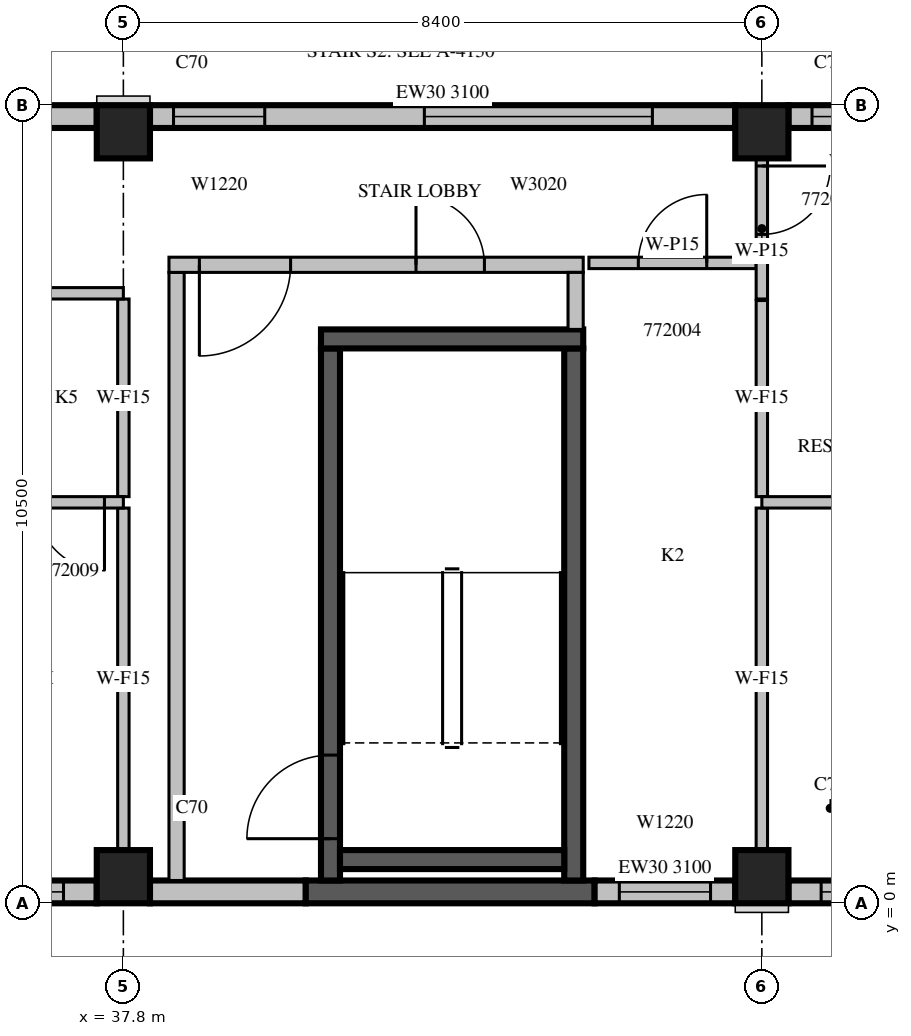
"""IFC4 building model, lengths in metres.
Left out: names, types, materials, properties, quantities, classifications, styles, units other than length and angle.
Written with IfcOpenShell. Run it as: python <this file> out.ifc"""

import sys

from ifc_helpers import new_model, si_unit, direction, frame, frame_2d, origin, origin_2d, place, context, subcontext, project, spatial, rectangle, extrude, source, transform, mapped, element, fill, save


model = new_model("IFC4")
c1 = context("Model", 3, precision=1e-05, world=origin(), true_north=direction((0.0, 1.0)))
c2 = subcontext(c1, "Body", "Model", "MODEL_VIEW")
j1 = project(units=[si_unit("LENGTHUNIT", "METRE"), si_unit("PLANEANGLEUNIT", "RADIAN")], contexts=[c1])
p1 = place(None, origin())
s1 = spatial("IfcSite", under=j1, at=p1, CompositionType="ELEMENT")
p2 = place(p1, origin())
s2 = spatial("IfcBuilding", under=s1, at=p2, CompositionType="ELEMENT")
p3 = place(p2, frame((0.0, 0.0, 312.5)))
s3 = spatial("IfcBuildingStorey", under=s2, at=p3, CompositionType="ELEMENT", Elevation=312.5)
m1 = source(origin(), c2, "Body", "SweptSolid", [
    extrude(rectangle(XDim=0.7, YDim=0.7, at=origin_2d()), origin(), (0.0, 0.0, 1.0), 3.5),
])
for number, where, z_axis, x_axis in (
    (1, (37.8, 0.35, 0.0), (0.0, 0.0, 1.0), (1.0, 0.0, 0.0)),
    (2, (46.2, 0.35, 0.0), (0.0, 0.0, 1.0), (1.0, 0.0, 0.0)),
    (3, (37.8, 10.15, 0.0), (0.0, 0.0, 1.0), (1.0, 0.0, 0.0)),
    (4, (46.2, 10.15, 0.0), (0.0, 0.0, 1.0), (1.0, 0.0, 0.0)),
):
    element("IfcColumn", number, at=place(p3, frame(where, z_axis=z_axis, x_axis=x_axis)), inside=s3, PredefinedType="COLUMN", context=c2, shape_type="MappedRepresentation", body=[
        mapped(m1, transform((0.0, 0.0, 0.0), scale=1.0)),
    ])
m2 = source(origin(), c2, "Body", "SweptSolid", [
    extrude(rectangle(XDim=7.7, YDim=0.3, at=frame_2d((3.85, 0.0))), origin(), (0.0, 0.0, 1.0), 3.1),
])
p4 = place(p3, frame((29.75, 0.15, 0.0), z_axis=(0.0, 0.0, 1.0), x_axis=(1.0, 0.0, 0.0)))
e5 = element("IfcWall", 5, at=p4, inside=s3, PredefinedType="STANDARD", context=c2, shape_type="MappedRepresentation", body=[
    mapped(m2, transform((0.0, 0.0, 0.0), scale=1.0)),
])
m3 = source(origin(), c2, "Body", "SweptSolid", [
    extrude(rectangle(XDim=1.2, YDim=2.0, at=frame_2d((0.6, 1.0))), frame((0.0, 0.16, 0.0), z_axis=(0.0, -1.0, 0.0), x_axis=(1.0, 0.0, 0.0)), (0.0, 0.0, 1.0), 0.32),
])
p5 = place(p4, frame((0.537, 0.0, 0.6)))
e6 = element("IfcOpeningElement", 6, at=p5, cuts=e5, PredefinedType="OPENING", context=c2, shape_type="MappedRepresentation", body=[
    mapped(m3, transform((0.0, 0.0, 0.0), scale=1.0)),
])
p6 = place(p4, frame((6.062, 0.0, 0.6)))
e7 = element("IfcOpeningElement", 7, at=p6, cuts=e5, PredefinedType="OPENING", context=c2, shape_type="MappedRepresentation", body=[
    mapped(m3, transform((0.0, 0.0, 0.0), scale=1.0)),
])
m4 = source(origin(), c2, "Body", "SweptSolid", [
    extrude(rectangle(XDim=2.05, YDim=0.3, at=frame_2d((1.025, 0.0))), origin(), (0.0, 0.0, 1.0), 3.1),
])
p7 = place(p3, frame((38.15, 0.15, 0.0), z_axis=(0.0, 0.0, 1.0), x_axis=(1.0, 0.0, 0.0)))
e8 = element("IfcWall", 8, at=p7, inside=s3, PredefinedType="STANDARD", context=c2, shape_type="MappedRepresentation", body=[
    mapped(m4, transform((0.0, 0.0, 0.0), scale=1.0)),
])
m5 = source(origin(), c2, "Body", "SweptSolid", [
    extrude(rectangle(XDim=3.8, YDim=0.3, at=frame_2d((1.9, 0.0))), origin(), (0.0, 0.0, 1.0), 3.1),
])
p8 = place(p3, frame((40.2, 0.15, 0.0), z_axis=(0.0, 0.0, 1.0), x_axis=(1.0, 0.0, 0.0)))
e9 = element("IfcWall", 9, at=p8, inside=s3, PredefinedType="SOLIDWALL", context=c2, shape_type="MappedRepresentation", body=[
    mapped(m5, transform((0.0, 0.0, 0.0), scale=1.0)),
])
m6 = source(origin(), c2, "Body", "SweptSolid", [
    extrude(rectangle(XDim=1.85, YDim=0.3, at=frame_2d((0.925, 0.0))), origin(), (0.0, 0.0, 1.0), 3.1),
])
p9 = place(p3, frame((44.0, 0.15, 0.0), z_axis=(0.0, 0.0, 1.0), x_axis=(1.0, 0.0, 0.0)))
e10 = element("IfcWall", 10, at=p9, inside=s3, PredefinedType="STANDARD", context=c2, shape_type="MappedRepresentation", body=[
    mapped(m6, transform((0.0, 0.0, 0.0), scale=1.0)),
])
p10 = place(p9, frame((0.325, 0.0, 0.6)))
e11 = element("IfcOpeningElement", 11, at=p10, cuts=e10, PredefinedType="OPENING", context=c2, shape_type="MappedRepresentation", body=[
    mapped(m3, transform((0.0, 0.0, 0.0), scale=1.0)),
])
m7 = source(origin(), c2, "Body", "SweptSolid", [
    extrude(rectangle(XDim=3.01, YDim=0.3, at=frame_2d((1.505, 0.0))), origin(), (0.0, 0.0, 1.0), 3.1),
])
p11 = place(p3, frame((46.55, 0.15, 0.0), z_axis=(0.0, 0.0, 1.0), x_axis=(1.0, 0.0, 0.0)))
e12 = element("IfcWall", 12, at=p11, inside=s3, PredefinedType="STANDARD", context=c2, shape_type="MappedRepresentation", body=[
    mapped(m7, transform((0.0, 0.0, 0.0), scale=1.0)),
])
m8 = source(origin(), c2, "Body", "SweptSolid", [
    extrude(rectangle(XDim=1.8, YDim=2.0, at=frame_2d((0.9, 1.0))), frame((0.0, 0.16, 0.0), z_axis=(0.0, -1.0, 0.0), x_axis=(1.0, 0.0, 0.0)), (0.0, 0.0, 1.0), 0.32),
])
p12 = place(p11, frame((0.43, 0.0, 0.6)))
e13 = element("IfcOpeningElement", 13, at=p12, cuts=e12, PredefinedType="OPENING", context=c2, shape_type="MappedRepresentation", body=[
    mapped(m8, transform((0.0, 0.0, 0.0), scale=1.0)),
])
p13 = place(p3, frame((49.56, 10.35, 0.0), z_axis=(0.0, 0.0, 1.0), x_axis=(-1.0, 0.0, 0.0)))
e14 = element("IfcWall", 14, at=p13, inside=s3, PredefinedType="STANDARD", context=c2, shape_type="MappedRepresentation", body=[
    mapped(m7, transform((0.0, 0.0, 0.0), scale=1.0)),
])
p14 = place(p13, frame((1.5, 0.0, 0.6)))
e15 = element("IfcOpeningElement", 15, at=p14, cuts=e14, PredefinedType="OPENING", context=c2, shape_type="MappedRepresentation", body=[
    mapped(m3, transform((0.0, 0.0, 0.0), scale=1.0)),
])
p15 = place(p3, frame((45.85, 10.35, 0.0), z_axis=(0.0, 0.0, 1.0), x_axis=(-1.0, 0.0, 0.0)))
e16 = element("IfcWall", 16, at=p15, inside=s3, PredefinedType="STANDARD", context=c2, shape_type="MappedRepresentation", body=[
    mapped(m2, transform((0.0, 0.0, 0.0), scale=1.0)),
])
m9 = source(origin(), c2, "Body", "SweptSolid", [
    extrude(rectangle(XDim=3.0, YDim=2.0, at=frame_2d((1.5, 1.0))), frame((0.0, 0.16, 0.0), z_axis=(0.0, -1.0, 0.0), x_axis=(1.0, 0.0, 0.0)), (0.0, 0.0, 1.0), 0.32),
])
p16 = place(p15, frame((1.09, 0.0, 0.6)))
e17 = element("IfcOpeningElement", 17, at=p16, cuts=e16, PredefinedType="OPENING", context=c2, shape_type="MappedRepresentation", body=[
    mapped(m9, transform((0.0, 0.0, 0.0), scale=1.0)),
])
p17 = place(p15, frame((6.19, 0.0, 0.6)))
e18 = element("IfcOpeningElement", 18, at=p17, cuts=e16, PredefinedType="OPENING", context=c2, shape_type="MappedRepresentation", body=[
    mapped(m3, transform((0.0, 0.0, 0.0), scale=1.0)),
])
p18 = place(p3, frame((37.45, 10.35, 0.0), z_axis=(0.0, 0.0, 1.0), x_axis=(-1.0, 0.0, 0.0)))
e19 = element("IfcWall", 19, at=p18, inside=s3, PredefinedType="STANDARD", context=c2, shape_type="MappedRepresentation", body=[
    mapped(m2, transform((0.0, 0.0, 0.0), scale=1.0)),
])
p19 = place(p18, frame((1.09, 0.0, 0.6)))
e20 = element("IfcOpeningElement", 20, at=p19, cuts=e19, PredefinedType="OPENING", context=c2, shape_type="MappedRepresentation", body=[
    mapped(m9, transform((0.0, 0.0, 0.0), scale=1.0)),
])
p20 = place(p18, frame((6.19, 0.0, 0.6)))
e21 = element("IfcOpeningElement", 21, at=p20, cuts=e19, PredefinedType="OPENING", context=c2, shape_type="MappedRepresentation", body=[
    mapped(m3, transform((0.0, 0.0, 0.0), scale=1.0)),
])
m10 = source(origin(), c2, "Body", "SweptSolid", [
    extrude(rectangle(XDim=7.0, YDim=0.25, at=frame_2d((3.5, 0.0))), origin(), (0.0, 0.0, 1.0), 3.1),
])
p21 = place(p3, frame((40.525, 0.3, 0.0), z_axis=(0.0, 0.0, 1.0), x_axis=(0.0, 1.0, 0.0)))
e22 = element("IfcWall", 22, at=p21, inside=s3, PredefinedType="SOLIDWALL", context=c2, shape_type="MappedRepresentation", body=[
    mapped(m10, transform((0.0, 0.0, 0.0), scale=1.0)),
])
m11 = source(origin(), c2, "Body", "SweptSolid", [
    extrude(rectangle(XDim=1.1, YDim=2.1, at=frame_2d((0.55, 1.05))), frame((0.0, 0.135, 0.0), z_axis=(0.0, -1.0, 0.0), x_axis=(1.0, 0.0, 0.0)), (0.0, 0.0, 1.0), 0.27),
])
p22 = place(p21, frame((0.55, 0.0, 0.0)))
e23 = element("IfcOpeningElement", 23, at=p22, cuts=e22, PredefinedType="OPENING", context=c2, shape_type="MappedRepresentation", body=[
    mapped(m11, transform((0.0, 0.0, 0.0), scale=1.0)),
])
p23 = place(p3, frame((43.725, 0.3, 0.0), z_axis=(0.0, 0.0, 1.0), x_axis=(0.0, 1.0, 0.0)))
e24 = element("IfcWall", 24, at=p23, inside=s3, PredefinedType="SOLIDWALL", context=c2, shape_type="MappedRepresentation", body=[
    mapped(m10, transform((0.0, 0.0, 0.0), scale=1.0)),
])
m12 = source(origin(), c2, "Body", "SweptSolid", [
    extrude(rectangle(XDim=3.45, YDim=0.25, at=frame_2d((1.725, 0.0))), origin(), (0.0, 0.0, 1.0), 3.1),
])
p24 = place(p3, frame((40.4, 7.425, 0.0), z_axis=(0.0, 0.0, 1.0), x_axis=(1.0, 0.0, 0.0)))
e25 = element("IfcWall", 25, at=p24, inside=s3, PredefinedType="SOLIDWALL", context=c2, shape_type="MappedRepresentation", body=[
    mapped(m12, transform((0.0, 0.0, 0.0), scale=1.0)),
])
m13 = source(origin(), c2, "Body", "SweptSolid", [
    extrude(rectangle(XDim=2.95, YDim=0.25, at=frame_2d((1.475, 0.0))), origin(), (0.0, 0.0, 1.0), 3.1),
])
p25 = place(p3, frame((40.65, 0.575, 0.0), z_axis=(0.0, 0.0, 1.0), x_axis=(1.0, 0.0, 0.0)))
e26 = element("IfcWall", 26, at=p25, inside=s3, PredefinedType="SOLIDWALL", context=c2, shape_type="MappedRepresentation", body=[
    mapped(m13, transform((0.0, 0.0, 0.0), scale=1.0)),
])
m14 = source(origin(), c2, "Body", "SweptSolid", [
    extrude(rectangle(XDim=8.0, YDim=0.2, at=frame_2d((4.0, 0.0))), origin(), (0.0, 0.0, 1.0), 3.1),
])
p26 = place(p3, frame((38.5, 0.3, 0.0), z_axis=(0.0, 0.0, 1.0), x_axis=(0.0, 1.0, 0.0)))
e27 = element("IfcWall", 27, at=p26, inside=s3, PredefinedType="PARTITIONING", context=c2, shape_type="MappedRepresentation", body=[
    mapped(m14, transform((0.0, 0.0, 0.0), scale=1.0)),
])
m15 = source(origin(), c2, "Body", "SweptSolid", [
    extrude(rectangle(XDim=5.45, YDim=0.2, at=frame_2d((2.725, 0.0))), origin(), (0.0, 0.0, 1.0), 3.1),
])
p27 = place(p3, frame((38.4, 8.4, 0.0), z_axis=(0.0, 0.0, 1.0), x_axis=(1.0, 0.0, 0.0)))
e28 = element("IfcWall", 28, at=p27, inside=s3, PredefinedType="PARTITIONING", context=c2, shape_type="MappedRepresentation", body=[
    mapped(m15, transform((0.0, 0.0, 0.0), scale=1.0)),
])
m16 = source(origin(), c2, "Body", "SweptSolid", [
    extrude(rectangle(XDim=1.2, YDim=2.1, at=frame_2d((0.6, 1.05))), frame((0.0, 0.11, 0.0), z_axis=(0.0, -1.0, 0.0), x_axis=(1.0, 0.0, 0.0)), (0.0, 0.0, 1.0), 0.22),
])
p28 = place(p27, frame((0.4, 0.0, 0.0)))
e29 = element("IfcOpeningElement", 29, at=p28, cuts=e28, PredefinedType="OPENING", context=c2, shape_type="MappedRepresentation", body=[
    mapped(m16, transform((0.0, 0.0, 0.0), scale=1.0)),
])
m17 = source(origin(), c2, "Body", "SweptSolid", [
    extrude(rectangle(XDim=0.9, YDim=2.1, at=frame_2d((0.45, 1.05))), frame((0.0, 0.11, 0.0), z_axis=(0.0, -1.0, 0.0), x_axis=(1.0, 0.0, 0.0)), (0.0, 0.0, 1.0), 0.22),
])
p29 = place(p27, frame((3.25, 0.0, 0.0)))
e30 = element("IfcOpeningElement", 30, at=p29, cuts=e28, PredefinedType="OPENING", context=c2, shape_type="MappedRepresentation", body=[
    mapped(m17, transform((0.0, 0.0, 0.0), scale=1.0)),
])
m18 = source(origin(), c2, "Body", "SweptSolid", [
    extrude(rectangle(XDim=0.75, YDim=0.2, at=frame_2d((0.375, 0.0))), origin(), (0.0, 0.0, 1.0), 3.1),
])
p30 = place(p3, frame((43.75, 7.55, 0.0), z_axis=(0.0, 0.0, 1.0), x_axis=(0.0, 1.0, 0.0)))
e31 = element("IfcWall", 31, at=p30, inside=s3, PredefinedType="PARTITIONING", context=c2, shape_type="MappedRepresentation", body=[
    mapped(m18, transform((0.0, 0.0, 0.0), scale=1.0)),
])
m19 = source(origin(), c2, "Body", "SweptSolid", [
    extrude(rectangle(XDim=2.2, YDim=0.15, at=frame_2d((1.1, 0.0))), origin(), (0.0, 0.0, 1.0), 3.1),
])
p31 = place(p3, frame((46.125, 8.425, 0.0), z_axis=(0.0, 0.0, 1.0), x_axis=(-1.0, 0.0, 0.0)))
e32 = element("IfcWall", 32, at=p31, inside=s3, PredefinedType="PARTITIONING", context=c2, shape_type="MappedRepresentation", body=[
    mapped(m19, transform((0.0, 0.0, 0.0), scale=1.0)),
])
m20 = source(origin(), c2, "Body", "SweptSolid", [
    extrude(rectangle(XDim=0.9, YDim=2.1, at=frame_2d((0.45, 1.05))), frame((0.0, 0.085, 0.0), z_axis=(0.0, -1.0, 0.0), x_axis=(1.0, 0.0, 0.0)), (0.0, 0.0, 1.0), 0.17),
])
p32 = place(p31, frame((0.65, 0.0, 0.0)))
e33 = element("IfcOpeningElement", 33, at=p32, cuts=e32, PredefinedType="OPENING", context=c2, shape_type="MappedRepresentation", body=[
    mapped(m20, transform((0.0, 0.0, 0.0), scale=1.0)),
])
p33 = place(p3, frame((37.8, 0.699, 0.0), z_axis=(0.0, 0.0, 1.0), x_axis=(0.0, 1.0, 0.0)))
e34 = element("IfcWall", 34, at=p33, inside=s3, PredefinedType="PARTITIONING", context=c2, shape_type="SweptSolid", body=[
    extrude(rectangle(XDim=4.501, YDim=0.15, at=frame_2d((2.251, 0.0))), origin(), (0.0, 0.0, 1.0), 3.1),
])
m21 = source(origin(), c2, "Body", "SweptSolid", [
    extrude(rectangle(XDim=2.6, YDim=0.15, at=frame_2d((1.3, 0.0))), origin(), (0.0, 0.0, 1.0), 3.1),
])
p34 = place(p3, frame((37.8, 5.35, 0.0), z_axis=(0.0, 0.0, 1.0), x_axis=(0.0, 1.0, 0.0)))
e35 = element("IfcWall", 35, at=p34, inside=s3, PredefinedType="PARTITIONING", context=c2, shape_type="MappedRepresentation", body=[
    mapped(m21, transform((0.0, 0.0, 0.0), scale=1.0)),
])
m22 = source(origin(), c2, "Body", "SweptSolid", [
    extrude(rectangle(XDim=8.4, YDim=0.15, at=frame_2d((4.2, 0.0))), origin(), (0.0, 0.0, 1.0), 3.1),
])
p35 = place(p3, frame((37.8, 5.275, 0.0), z_axis=(0.0, 0.0, 1.0), x_axis=(-1.0, 0.0, 0.0)))
e36 = element("IfcWall", 36, at=p35, inside=s3, PredefinedType="PARTITIONING", context=c2, shape_type="MappedRepresentation", body=[
    mapped(m22, transform((0.0, 0.0, 0.0), scale=1.0)),
])
m23 = source(origin(), c2, "Body", "SweptSolid", [
    extrude(rectangle(XDim=1.0, YDim=2.1, at=frame_2d((0.5, 1.05))), frame((0.0, 0.085, 0.0), z_axis=(0.0, -1.0, 0.0), x_axis=(1.0, 0.0, 0.0)), (0.0, 0.0, 1.0), 0.17),
])
p36 = place(p35, frame((4.332, 0.0, 0.0)))
e37 = element("IfcOpeningElement", 37, at=p36, cuts=e36, PredefinedType="OPENING", context=c2, shape_type="MappedRepresentation", body=[
    mapped(m23, transform((0.0, 0.0, 0.0), scale=1.0)),
])
p37 = place(p35, frame((6.433, 0.0, 0.0)))
e38 = element("IfcOpeningElement", 38, at=p37, cuts=e36, PredefinedType="OPENING", context=c2, shape_type="MappedRepresentation", body=[
    mapped(m20, transform((0.0, 0.0, 0.0), scale=1.0)),
])
p38 = place(p35, frame((0.248, 0.0, 0.0)))
e39 = element("IfcOpeningElement", 39, at=p38, cuts=e36, PredefinedType="OPENING", context=c2, shape_type="MappedRepresentation", body=[
    mapped(m20, transform((0.0, 0.0, 0.0), scale=1.0)),
])
m24 = source(origin(), c2, "Body", "SweptSolid", [
    extrude(rectangle(XDim=1.851, YDim=0.15, at=frame_2d((0.925, 0.0))), origin(), (0.0, 0.0, 1.0), 3.1),
])
p39 = place(p3, frame((46.2, 9.801, 0.0), z_axis=(0.0, 0.0, 1.0), x_axis=(0.0, -1.0, 0.0)))
e40 = element("IfcWall", 40, at=p39, inside=s3, PredefinedType="PARTITIONING", context=c2, shape_type="MappedRepresentation", body=[
    mapped(m24, transform((0.0, 0.0, 0.0), scale=1.0)),
])
p40 = place(p39, frame((0.101, 0.0, 0.0)))
e41 = element("IfcOpeningElement", 41, at=p40, cuts=e40, PredefinedType="OPENING", context=c2, shape_type="MappedRepresentation", body=[
    mapped(m20, transform((0.0, 0.0, 0.0), scale=1.0)),
])
m25 = source(origin(), c2, "Body", "SweptSolid", [
    extrude(rectangle(XDim=4.501, YDim=0.15, at=frame_2d((2.251, 0.0))), origin(), (0.0, 0.0, 1.0), 3.1),
])
p41 = place(p3, frame((46.2, 0.699, 0.0), z_axis=(0.0, 0.0, 1.0), x_axis=(0.0, 1.0, 0.0)))
e42 = element("IfcWall", 42, at=p41, inside=s3, PredefinedType="PARTITIONING", context=c2, shape_type="MappedRepresentation", body=[
    mapped(m25, transform((0.0, 0.0, 0.0), scale=1.0)),
])
p42 = place(p3, frame((46.2, 5.35, 0.0), z_axis=(0.0, 0.0, 1.0), x_axis=(0.0, 1.0, 0.0)))
e43 = element("IfcWall", 43, at=p42, inside=s3, PredefinedType="PARTITIONING", context=c2, shape_type="SweptSolid", body=[
    extrude(rectangle(XDim=2.58, YDim=0.15, at=frame_2d((1.29, 0.0))), origin(), (0.0, 0.0, 1.0), 3.1),
])
m26 = source(origin(), c2, "Body", "SweptSolid", [
    extrude(rectangle(XDim=3.06, YDim=0.15, at=frame_2d((1.53, 0.0))), origin(), (0.0, 0.0, 1.0), 3.1),
])
p43 = place(p3, frame((49.26, 5.275, 0.0), z_axis=(0.0, 0.0, 1.0), x_axis=(-1.0, 0.0, 0.0)))
e44 = element("IfcWall", 44, at=p43, inside=s3, PredefinedType="PARTITIONING", context=c2, shape_type="MappedRepresentation", body=[
    mapped(m26, transform((0.0, 0.0, 0.0), scale=1.0)),
])
p44 = place(p3, frame((37.8, 8.025, 0.0), z_axis=(0.0, 0.0, 1.0), x_axis=(-1.0, 0.0, 0.0)))
e45 = element("IfcWall", 45, at=p44, inside=s3, PredefinedType="PARTITIONING", context=c2, shape_type="MappedRepresentation", body=[
    mapped(m22, transform((0.0, 0.0, 0.0), scale=1.0)),
])
p45 = place(p44, frame((3.933, 0.0, 0.0)))
e46 = element("IfcOpeningElement", 46, at=p45, cuts=e45, PredefinedType="OPENING", context=c2, shape_type="MappedRepresentation", body=[
    mapped(m23, transform((0.0, 0.0, 0.0), scale=1.0)),
])
m27 = source(origin(), c2, "Body", "SweptSolid", [
    extrude(rectangle(XDim=1.2, YDim=2.0, at=frame_2d((0.6, 1.0))), frame((0.0, 0.03, 0.0), z_axis=(0.0, -1.0, 0.0), x_axis=(1.0, 0.0, 0.0)), (0.0, 0.0, 1.0), 0.06),
])
p46 = place(p6, origin())
e47 = element("IfcWindow", 47, at=p46, inside=s3, PartitioningType="SINGLE_PANEL", PredefinedType="WINDOW", context=c2, shape_type="MappedRepresentation", body=[
    mapped(m27, transform((0.0, 0.0, 0.0), scale=1.0)),
])
fill(e7, e47)
p47 = place(p10, origin())
e48 = element("IfcWindow", 48, at=p47, inside=s3, PartitioningType="SINGLE_PANEL", PredefinedType="WINDOW", context=c2, shape_type="MappedRepresentation", body=[
    mapped(m27, transform((0.0, 0.0, 0.0), scale=1.0)),
])
fill(e11, e48)
m28 = source(origin(), c2, "Body", "SweptSolid", [
    extrude(rectangle(XDim=1.8, YDim=2.0, at=frame_2d((0.9, 1.0))), frame((0.0, 0.03, 0.0), z_axis=(0.0, -1.0, 0.0), x_axis=(1.0, 0.0, 0.0)), (0.0, 0.0, 1.0), 0.06),
])
p48 = place(p12, origin())
e49 = element("IfcWindow", 49, at=p48, inside=s3, PartitioningType="SINGLE_PANEL", PredefinedType="WINDOW", context=c2, shape_type="MappedRepresentation", body=[
    mapped(m28, transform((0.0, 0.0, 0.0), scale=1.0)),
])
fill(e13, e49)
p49 = place(p14, origin())
e50 = element("IfcWindow", 50, at=p49, inside=s3, PartitioningType="SINGLE_PANEL", PredefinedType="WINDOW", context=c2, shape_type="MappedRepresentation", body=[
    mapped(m27, transform((0.0, 0.0, 0.0), scale=1.0)),
])
fill(e15, e50)
m29 = source(origin(), c2, "Body", "SweptSolid", [
    extrude(rectangle(XDim=3.0, YDim=2.0, at=frame_2d((1.5, 1.0))), frame((0.0, 0.03, 0.0), z_axis=(0.0, -1.0, 0.0), x_axis=(1.0, 0.0, 0.0)), (0.0, 0.0, 1.0), 0.06),
])
p50 = place(p16, origin())
e51 = element("IfcWindow", 51, at=p50, inside=s3, PartitioningType="SINGLE_PANEL", PredefinedType="WINDOW", context=c2, shape_type="MappedRepresentation", body=[
    mapped(m29, transform((0.0, 0.0, 0.0), scale=1.0)),
])
fill(e17, e51)
p51 = place(p17, origin())
e52 = element("IfcWindow", 52, at=p51, inside=s3, PartitioningType="SINGLE_PANEL", PredefinedType="WINDOW", context=c2, shape_type="MappedRepresentation", body=[
    mapped(m27, transform((0.0, 0.0, 0.0), scale=1.0)),
])
fill(e18, e52)
m30 = source(origin(), c2, "Body", "SweptSolid", [
    extrude(rectangle(XDim=1.1, YDim=2.1, at=frame_2d((0.55, 1.05))), frame((0.0, 0.025, 0.0), z_axis=(0.0, -1.0, 0.0), x_axis=(1.0, 0.0, 0.0)), (0.0, 0.0, 1.0), 0.05),
])
p52 = place(p22, origin())
e53 = element("IfcDoor", 53, at=p52, inside=s3, OperationType="SINGLE_SWING_LEFT", PredefinedType="DOOR", context=c2, shape_type="MappedRepresentation", body=[
    mapped(m30, transform((0.0, 0.0, 0.0), scale=1.0)),
])
fill(e23, e53)
m31 = source(origin(), c2, "Body", "SweptSolid", [
    extrude(rectangle(XDim=1.2, YDim=2.1, at=frame_2d((0.6, 1.05))), frame((0.0, 0.025, 0.0), z_axis=(0.0, -1.0, 0.0), x_axis=(1.0, 0.0, 0.0)), (0.0, 0.0, 1.0), 0.05),
])
p53 = place(p28, origin())
e54 = element("IfcDoor", 54, at=p53, inside=s3, OperationType="SINGLE_SWING_RIGHT", PredefinedType="DOOR", context=c2, shape_type="MappedRepresentation", body=[
    mapped(m31, transform((0.0, 0.0, 0.0), scale=1.0)),
])
fill(e29, e54)
m32 = source(origin(), c2, "Body", "SweptSolid", [
    extrude(rectangle(XDim=0.9, YDim=2.1, at=frame_2d((0.45, 1.05))), frame((0.0, 0.025, 0.0), z_axis=(0.0, -1.0, 0.0), x_axis=(1.0, 0.0, 0.0)), (0.0, 0.0, 1.0), 0.05),
])
p54 = place(p29, origin())
e55 = element("IfcDoor", 55, at=p54, inside=s3, OperationType="SINGLE_SWING_LEFT", PredefinedType="DOOR", context=c2, shape_type="MappedRepresentation", body=[
    mapped(m32, transform((0.0, 0.0, 0.0), scale=1.0)),
])
fill(e30, e55)
p55 = place(p32, origin())
e56 = element("IfcDoor", 56, at=p55, inside=s3, OperationType="SINGLE_SWING_RIGHT", PredefinedType="DOOR", context=c2, shape_type="MappedRepresentation", body=[
    mapped(m32, transform((0.0, 0.0, 0.0), scale=1.0)),
])
fill(e33, e56)
p56 = place(p38, origin())
e57 = element("IfcDoor", 57, at=p56, inside=s3, OperationType="SINGLE_SWING_LEFT", PredefinedType="DOOR", context=c2, shape_type="MappedRepresentation", body=[
    mapped(m32, transform((0.0, 0.0, 0.0), scale=1.0)),
])
fill(e39, e57)
p57 = place(p40, origin())
e58 = element("IfcDoor", 58, at=p57, inside=s3, OperationType="SINGLE_SWING_LEFT", PredefinedType="DOOR", context=c2, shape_type="MappedRepresentation", body=[
    mapped(m32, transform((0.0, 0.0, 0.0), scale=1.0)),
])
fill(e41, e58)
save(model, sys.argv[1])
